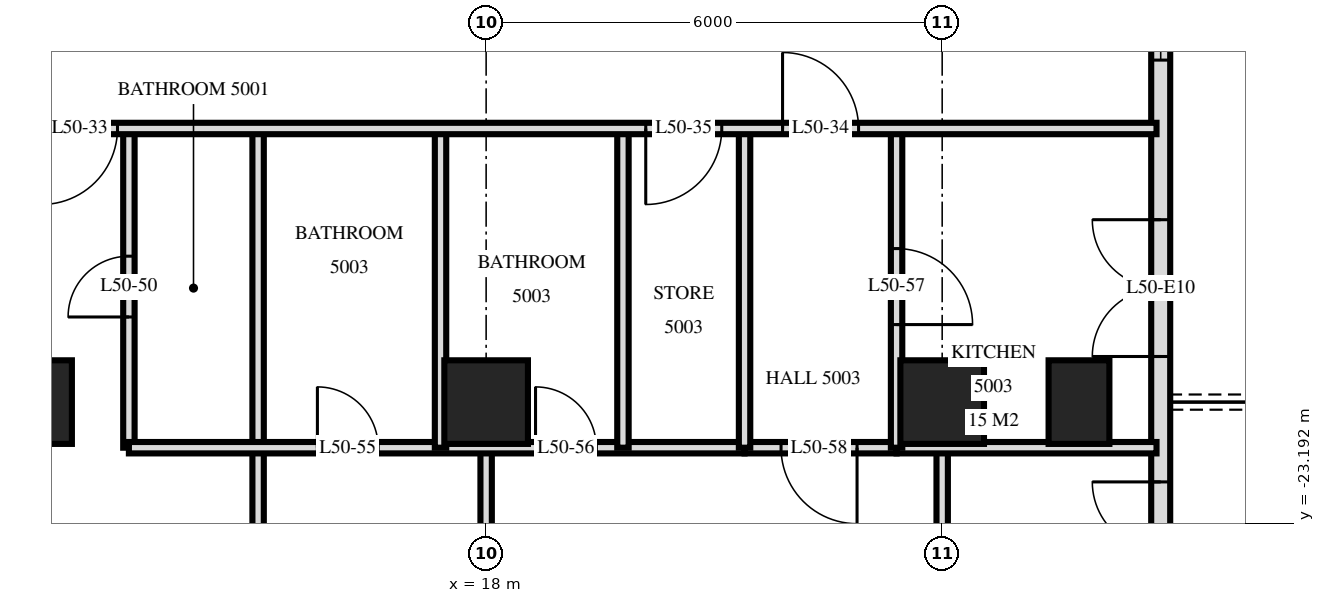
"""IFC4 building model, lengths in metres.
Left out: names, types, materials, properties, quantities, classifications, styles, units other than length and angle.
Written with IfcOpenShell. Run it as: python <this file> out.ifc"""

import sys

from ifc_helpers import new_model, si_unit, direction, frame, frame_2d, origin, origin_2d, place, context, subcontext, project, spatial, rectangle, extrude, element, fill, save


model = new_model("IFC4")
c1 = context("Model", 3, precision=1e-05, world=origin(), true_north=direction((0.0, 1.0)))
c2 = subcontext(c1, "Body", "Model", "MODEL_VIEW")
j1 = project(units=[si_unit("LENGTHUNIT", "METRE"), si_unit("PLANEANGLEUNIT", "RADIAN")], contexts=[c1])
p1 = place(None, origin())
s1 = spatial("IfcSite", under=j1, at=p1, CompositionType="ELEMENT")
p2 = place(p1, origin())
s2 = spatial("IfcBuilding", under=s1, at=p2, CompositionType="ELEMENT")
p3 = place(p2, frame((0.0, 0.0, 194.1)))
s3 = spatial("IfcBuildingStorey", under=s2, at=p3, CompositionType="ELEMENT", Elevation=194.1)
for number, where, z_axis, x_axis in (
    (1, (12.0, -21.6, 0.0), (0.0, 0.0, 1.0), (1.0, 0.0, 0.0)),
    (2, (18.0, -21.6, 0.0), (0.0, 0.0, 1.0), (1.0, 0.0, 0.0)),
    (3, (24.0, -21.6, 0.0), (0.0, 0.0, 1.0), (1.0, 0.0, 0.0)),
):
    element("IfcColumn", number, at=place(p3, frame(where, z_axis=z_axis, x_axis=x_axis)), inside=s3, PredefinedType="COLUMN", context=c2, shape_type="SweptSolid", body=[
        extrude(rectangle(XDim=1.1, YDim=1.1, at=origin_2d()), origin(), (0.0, 0.0, 1.0), 3.5),
    ])
p4 = place(p3, frame((25.8, -21.6, 0.0), z_axis=(0.0, 0.0, 1.0), x_axis=(0.0, 1.0, 0.0)))
e4 = element("IfcColumn", 4, at=p4, inside=s3, PredefinedType="COLUMN", context=c2, shape_type="SweptSolid", body=[
    extrude(rectangle(XDim=1.1, YDim=0.8, at=origin_2d()), origin(), (0.0, 0.0, 1.0), 3.5),
])
p5 = place(p3, frame((26.875, -24.875, 0.0), z_axis=(0.0, 0.0, 1.0), x_axis=(0.0, 1.0, 0.0)))
e5 = element("IfcWall", 5, at=p5, inside=s3, PredefinedType="SOLIDWALL", context=c2, shape_type="SweptSolid", body=[
    extrude(rectangle(XDim=21.551, YDim=0.25, at=frame_2d((10.775, 0.0))), origin(), (0.0, 0.0, 1.0), 3.22),
])
p6 = place(p5, frame((0.425, 0.0, 0.0)))
e6 = element("IfcOpeningElement", 6, at=p6, cuts=e5, PredefinedType="OPENING", context=c2, shape_type="SweptSolid", body=[
    extrude(rectangle(XDim=1.8, YDim=2.4, at=frame_2d((0.9, 1.2))), frame((0.0, 0.135, 0.0), z_axis=(0.0, -1.0, 0.0), x_axis=(1.0, 0.0, 0.0)), (0.0, 0.0, 1.0), 0.27),
])
p7 = place(p5, frame((3.875, 0.0, 0.0)))
e7 = element("IfcOpeningElement", 7, at=p7, cuts=e5, PredefinedType="OPENING", context=c2, shape_type="SweptSolid", body=[
    extrude(rectangle(XDim=1.8, YDim=2.4, at=frame_2d((0.9, 1.2))), frame((0.0, 0.135, 0.0), z_axis=(0.0, -1.0, 0.0), x_axis=(1.0, 0.0, 0.0)), (0.0, 0.0, 1.0), 0.27),
])
p8 = place(p5, frame((7.775, 0.0, 0.9)))
e8 = element("IfcOpeningElement", 8, at=p8, cuts=e5, PredefinedType="OPENING", context=c2, shape_type="SweptSolid", body=[
    extrude(rectangle(XDim=1.2, YDim=1.5, at=frame_2d((0.6, 0.75))), frame((0.0, 0.135, 0.0), z_axis=(0.0, -1.0, 0.0), x_axis=(1.0, 0.0, 0.0)), (0.0, 0.0, 1.0), 0.27),
])
p9 = place(p5, frame((11.975, 0.0, 0.0)))
e9 = element("IfcOpeningElement", 9, at=p9, cuts=e5, PredefinedType="OPENING", context=c2, shape_type="SweptSolid", body=[
    extrude(rectangle(XDim=1.8, YDim=2.4, at=frame_2d((0.9, 1.2))), frame((0.0, 0.135, 0.0), z_axis=(0.0, -1.0, 0.0), x_axis=(1.0, 0.0, 0.0)), (0.0, 0.0, 1.0), 0.27),
])
p10 = place(p3, frame((24.0, -28.918, 0.0), z_axis=(0.0, 0.0, 1.0), x_axis=(0.0, 1.0, 0.0)))
e10 = element("IfcWall", 10, at=p10, inside=s3, PredefinedType="PARTITIONING", context=c2, shape_type="SweptSolid", body=[
    extrude(rectangle(XDim=6.718, YDim=0.15, at=frame_2d((3.359, 0.0))), origin(), (0.0, 0.0, 1.0), 3.22),
])
p11 = place(p10, frame((2.948, 0.0, 0.0)))
e11 = element("IfcOpeningElement", 11, at=p11, cuts=e10, PredefinedType="OPENING", context=c2, shape_type="SweptSolid", body=[
    extrude(rectangle(XDim=0.9, YDim=2.1, at=frame_2d((0.45, 1.05))), frame((0.0, 0.085, 0.0), z_axis=(0.0, -1.0, 0.0), x_axis=(1.0, 0.0, 0.0)), (0.0, 0.0, 1.0), 0.17),
])
p12 = place(p3, frame((23.4, -22.2, 0.0), z_axis=(0.0, 0.0, 1.0), x_axis=(0.0, 1.0, 0.0)))
e12 = element("IfcWall", 12, at=p12, inside=s3, PredefinedType="PARTITIONING", context=c2, shape_type="SweptSolid", body=[
    extrude(rectangle(XDim=4.2, YDim=0.15, at=frame_2d((2.1, 0.0))), origin(), (0.0, 0.0, 1.0), 3.22),
])
p13 = place(p12, frame((1.62, 0.0, 0.0)))
e13 = element("IfcOpeningElement", 13, at=p13, cuts=e12, PredefinedType="OPENING", context=c2, shape_type="SweptSolid", body=[
    extrude(rectangle(XDim=1.0, YDim=2.1, at=frame_2d((0.5, 1.05))), frame((0.0, 0.085, 0.0), z_axis=(0.0, -1.0, 0.0), x_axis=(1.0, 0.0, 0.0)), (0.0, 0.0, 1.0), 0.17),
])
for number, where, z_axis, x_axis in (
    (14, (21.4, -22.2, 0.0), (0.0, 0.0, 1.0), (0.0, 1.0, 0.0)),
    (15, (19.8, -22.2, 0.0), (0.0, 0.0, 1.0), (0.0, 1.0, 0.0)),
):
    element("IfcWall", number, at=place(p3, frame(where, z_axis=z_axis, x_axis=x_axis)), inside=s3, PredefinedType="PARTITIONING", context=c2, shape_type="SweptSolid", body=[
        extrude(rectangle(XDim=4.2, YDim=0.15, at=frame_2d((2.1, 0.0))), origin(), (0.0, 0.0, 1.0), 3.22),
    ])
p14 = place(p3, frame((18.0, -29.22, 0.0), z_axis=(0.0, 0.0, 1.0), x_axis=(0.0, 1.0, 0.0)))
e16 = element("IfcWall", 16, at=p14, inside=s3, PredefinedType="PARTITIONING", context=c2, shape_type="SweptSolid", body=[
    extrude(rectangle(XDim=7.02, YDim=0.15, at=frame_2d((3.51, 0.0))), origin(), (0.0, 0.0, 1.0), 3.22),
])
p15 = place(p14, frame((2.99, 0.0, 0.0)))
e17 = element("IfcOpeningElement", 17, at=p15, cuts=e16, PredefinedType="OPENING", context=c2, shape_type="SweptSolid", body=[
    extrude(rectangle(XDim=0.9, YDim=2.1, at=frame_2d((0.45, 1.05))), frame((0.0, 0.085, 0.0), z_axis=(0.0, -1.0, 0.0), x_axis=(1.0, 0.0, 0.0)), (0.0, 0.0, 1.0), 0.17),
])
p16 = place(p3, frame((17.4, -22.2, 0.0), z_axis=(0.0, 0.0, 1.0), x_axis=(0.0, 1.0, 0.0)))
e18 = element("IfcWall", 18, at=p16, inside=s3, PredefinedType="PARTITIONING", context=c2, shape_type="SweptSolid", body=[
    extrude(rectangle(XDim=4.2, YDim=0.15, at=frame_2d((2.1, 0.0))), origin(), (0.0, 0.0, 1.0), 3.22),
])
p17 = place(p3, frame((15.0, -29.22, 0.0), z_axis=(0.0, 0.0, 1.0), x_axis=(0.0, 1.0, 0.0)))
e19 = element("IfcWall", 19, at=p17, inside=s3, PredefinedType="PARTITIONING", context=c2, shape_type="SweptSolid", body=[
    extrude(rectangle(XDim=11.22, YDim=0.15, at=frame_2d((5.61, 0.0))), origin(), (0.0, 0.0, 1.0), 3.22),
])
p18 = place(p3, frame((13.3, -22.2, 0.0), z_axis=(0.0, 0.0, 1.0), x_axis=(0.0, 1.0, 0.0)))
e20 = element("IfcWall", 20, at=p18, inside=s3, PredefinedType="PARTITIONING", context=c2, shape_type="SweptSolid", body=[
    extrude(rectangle(XDim=4.2, YDim=0.15, at=frame_2d((2.1, 0.0))), origin(), (0.0, 0.0, 1.0), 3.22),
])
p19 = place(p18, frame((1.72, 0.0, 0.0)))
e21 = element("IfcOpeningElement", 21, at=p19, cuts=e20, PredefinedType="OPENING", context=c2, shape_type="SweptSolid", body=[
    extrude(rectangle(XDim=0.8, YDim=2.1, at=frame_2d((0.4, 1.05))), frame((0.0, 0.085, 0.0), z_axis=(0.0, -1.0, 0.0), x_axis=(1.0, 0.0, 0.0)), (0.0, 0.0, 1.0), 0.17),
])
p20 = place(p3, frame((21.4, -22.2, 0.0), z_axis=(0.0, 0.0, 1.0), x_axis=(1.0, 0.0, 0.0)))
e22 = element("IfcWall", 22, at=p20, inside=s3, PredefinedType="PARTITIONING", context=c2, shape_type="SweptSolid", body=[
    extrude(rectangle(XDim=2.0, YDim=0.15, at=frame_2d((1.0, 0.0))), origin(), (0.0, 0.0, 1.0), 3.22),
])
p21 = place(p20, frame((0.48, 0.0, 0.0)))
e23 = element("IfcOpeningElement", 23, at=p21, cuts=e22, PredefinedType="OPENING", context=c2, shape_type="SweptSolid", body=[
    extrude(rectangle(XDim=1.0, YDim=2.1, at=frame_2d((0.5, 1.05))), frame((0.0, 0.085, 0.0), z_axis=(0.0, -1.0, 0.0), x_axis=(1.0, 0.0, 0.0)), (0.0, 0.0, 1.0), 0.17),
])
p22 = place(p3, frame((13.3, -22.2, 0.0), z_axis=(0.0, 0.0, 1.0), x_axis=(1.0, 0.0, 0.0)))
e24 = element("IfcWall", 24, at=p22, inside=s3, PredefinedType="PARTITIONING", context=c2, shape_type="SweptSolid", body=[
    extrude(rectangle(XDim=8.1, YDim=0.15, at=frame_2d((4.05, 0.0))), origin(), (0.0, 0.0, 1.0), 3.22),
])
p23 = place(p22, frame((2.48, 0.0, 0.0)))
e25 = element("IfcOpeningElement", 25, at=p23, cuts=e24, PredefinedType="OPENING", context=c2, shape_type="SweptSolid", body=[
    extrude(rectangle(XDim=0.8, YDim=2.1, at=frame_2d((0.4, 1.05))), frame((0.0, 0.085, 0.0), z_axis=(0.0, -1.0, 0.0), x_axis=(1.0, 0.0, 0.0)), (0.0, 0.0, 1.0), 0.17),
])
p24 = place(p22, frame((5.35, 0.0, 0.0)))
e26 = element("IfcOpeningElement", 26, at=p24, cuts=e24, PredefinedType="OPENING", context=c2, shape_type="SweptSolid", body=[
    extrude(rectangle(XDim=0.8, YDim=2.1, at=frame_2d((0.4, 1.05))), frame((0.0, 0.085, 0.0), z_axis=(0.0, -1.0, 0.0), x_axis=(1.0, 0.0, 0.0)), (0.0, 0.0, 1.0), 0.17),
])
p25 = place(p3, frame((23.4, -22.2, 0.0), z_axis=(0.0, 0.0, 1.0), x_axis=(1.0, 0.0, 0.0)))
e27 = element("IfcWall", 27, at=p25, inside=s3, PredefinedType="PARTITIONING", context=c2, shape_type="SweptSolid", body=[
    extrude(rectangle(XDim=3.42, YDim=0.15, at=frame_2d((1.71, 0.0))), origin(), (0.0, 0.0, 1.0), 3.22),
])
p26 = place(p3, frame((-26.82, -18.0, 0.0), z_axis=(0.0, 0.0, 1.0), x_axis=(1.0, 0.0, 0.0)))
e28 = element("IfcWall", 28, at=p26, inside=s3, PredefinedType="PARTITIONING", context=c2, shape_type="SweptSolid", body=[
    extrude(rectangle(XDim=53.64, YDim=0.15, at=frame_2d((26.82, 0.0))), origin(), (0.0, 0.0, 1.0), 3.22),
])
p27 = place(p26, frame((11.32, 0.0, 0.0)))
e29 = element("IfcOpeningElement", 29, at=p27, cuts=e28, PredefinedType="OPENING", context=c2, shape_type="SweptSolid", body=[
    extrude(rectangle(XDim=1.0, YDim=2.1, at=frame_2d((0.5, 1.05))), frame((0.0, 0.085, 0.0), z_axis=(0.0, -1.0, 0.0), x_axis=(1.0, 0.0, 0.0)), (0.0, 0.0, 1.0), 0.17),
])
p28 = place(p26, frame((3.22, 0.0, 0.0)))
e30 = element("IfcOpeningElement", 30, at=p28, cuts=e28, PredefinedType="OPENING", context=c2, shape_type="SweptSolid", body=[
    extrude(rectangle(XDim=1.0, YDim=2.1, at=frame_2d((0.5, 1.05))), frame((0.0, 0.085, 0.0), z_axis=(0.0, -1.0, 0.0), x_axis=(1.0, 0.0, 0.0)), (0.0, 0.0, 1.0), 0.17),
])
p29 = place(p26, frame((5.02, 0.0, 0.0)))
e31 = element("IfcOpeningElement", 31, at=p29, cuts=e28, PredefinedType="OPENING", context=c2, shape_type="SweptSolid", body=[
    extrude(rectangle(XDim=1.0, YDim=2.1, at=frame_2d((0.5, 1.05))), frame((0.0, 0.085, 0.0), z_axis=(0.0, -1.0, 0.0), x_axis=(1.0, 0.0, 0.0)), (0.0, 0.0, 1.0), 0.17),
])
p30 = place(p26, frame((38.97, 0.0, 0.0)))
e32 = element("IfcOpeningElement", 32, at=p30, cuts=e28, PredefinedType="OPENING", context=c2, shape_type="SweptSolid", body=[
    extrude(rectangle(XDim=1.0, YDim=2.1, at=frame_2d((0.5, 1.05))), frame((0.0, 0.085, 0.0), z_axis=(0.0, -1.0, 0.0), x_axis=(1.0, 0.0, 0.0)), (0.0, 0.0, 1.0), 0.17),
])
p31 = place(p26, frame((48.72, 0.0, 0.0)))
e33 = element("IfcOpeningElement", 33, at=p31, cuts=e28, PredefinedType="OPENING", context=c2, shape_type="SweptSolid", body=[
    extrude(rectangle(XDim=1.0, YDim=2.1, at=frame_2d((0.5, 1.05))), frame((0.0, 0.085, 0.0), z_axis=(0.0, -1.0, 0.0), x_axis=(1.0, 0.0, 0.0)), (0.0, 0.0, 1.0), 0.17),
])
p32 = place(p26, frame((46.92, 0.0, 0.0)))
e34 = element("IfcOpeningElement", 34, at=p32, cuts=e28, PredefinedType="OPENING", context=c2, shape_type="SweptSolid", body=[
    extrude(rectangle(XDim=1.0, YDim=2.1, at=frame_2d((0.5, 1.05))), frame((0.0, 0.085, 0.0), z_axis=(0.0, -1.0, 0.0), x_axis=(1.0, 0.0, 0.0)), (0.0, 0.0, 1.0), 0.17),
])
p33 = place(p26, frame((17.32, 0.0, 0.0)))
e35 = element("IfcOpeningElement", 35, at=p33, cuts=e28, PredefinedType="OPENING", context=c2, shape_type="SweptSolid", body=[
    extrude(rectangle(XDim=1.0, YDim=2.1, at=frame_2d((0.5, 1.05))), frame((0.0, 0.085, 0.0), z_axis=(0.0, -1.0, 0.0), x_axis=(1.0, 0.0, 0.0)), (0.0, 0.0, 1.0), 0.17),
])
p34 = place(p26, frame((23.32, 0.0, 0.0)))
e36 = element("IfcOpeningElement", 36, at=p34, cuts=e28, PredefinedType="OPENING", context=c2, shape_type="SweptSolid", body=[
    extrude(rectangle(XDim=1.0, YDim=2.1, at=frame_2d((0.5, 1.05))), frame((0.0, 0.085, 0.0), z_axis=(0.0, -1.0, 0.0), x_axis=(1.0, 0.0, 0.0)), (0.0, 0.0, 1.0), 0.17),
])
p35 = place(p26, frame((29.32, 0.0, 0.0)))
e37 = element("IfcOpeningElement", 37, at=p35, cuts=e28, PredefinedType="OPENING", context=c2, shape_type="SweptSolid", body=[
    extrude(rectangle(XDim=1.0, YDim=2.1, at=frame_2d((0.5, 1.05))), frame((0.0, 0.085, 0.0), z_axis=(0.0, -1.0, 0.0), x_axis=(1.0, 0.0, 0.0)), (0.0, 0.0, 1.0), 0.17),
])
p36 = place(p26, frame((35.32, 0.0, 0.0)))
e38 = element("IfcOpeningElement", 38, at=p36, cuts=e28, PredefinedType="OPENING", context=c2, shape_type="SweptSolid", body=[
    extrude(rectangle(XDim=1.0, YDim=2.1, at=frame_2d((0.5, 1.05))), frame((0.0, 0.085, 0.0), z_axis=(0.0, -1.0, 0.0), x_axis=(1.0, 0.0, 0.0)), (0.0, 0.0, 1.0), 0.17),
])
p37 = place(p6, origin())
e39 = element("IfcDoor", 39, at=p37, inside=s3, OperationType="DOUBLE_DOOR_SINGLE_SWING", PredefinedType="DOOR", context=c2, shape_type="SweptSolid", body=[
    extrude(rectangle(XDim=1.8, YDim=2.4, at=frame_2d((0.9, 1.2))), frame((0.0, 0.025, 0.0), z_axis=(0.0, -1.0, 0.0), x_axis=(1.0, 0.0, 0.0)), (0.0, 0.0, 1.0), 0.05),
])
fill(e6, e39)
p38 = place(p7, origin())
e40 = element("IfcDoor", 40, at=p38, inside=s3, OperationType="DOUBLE_DOOR_SINGLE_SWING", PredefinedType="DOOR", context=c2, shape_type="SweptSolid", body=[
    extrude(rectangle(XDim=1.8, YDim=2.4, at=frame_2d((0.9, 1.2))), frame((0.0, 0.025, 0.0), z_axis=(0.0, -1.0, 0.0), x_axis=(1.0, 0.0, 0.0)), (0.0, 0.0, 1.0), 0.05),
])
fill(e7, e40)
p39 = place(p8, origin())
e41 = element("IfcWindow", 41, at=p39, inside=s3, PartitioningType="SINGLE_PANEL", PredefinedType="WINDOW", context=c2, shape_type="SweptSolid", body=[
    extrude(rectangle(XDim=1.2, YDim=1.5, at=frame_2d((0.6, 0.75))), frame((0.0, 0.03, 0.0), z_axis=(0.0, -1.0, 0.0), x_axis=(1.0, 0.0, 0.0)), (0.0, 0.0, 1.0), 0.06),
])
fill(e8, e41)
p40 = place(p30, frame((0.5, 0.0, 0.0), z_axis=(0.0, 0.0, 1.0), x_axis=(-1.0, 0.0, 0.0)))
e42 = element("IfcDoor", 42, at=p40, inside=s3, OperationType="SINGLE_SWING_LEFT", PredefinedType="DOOR", context=c2, shape_type="SweptSolid", body=[
    extrude(rectangle(XDim=1.0, YDim=2.1, at=frame_2d((0.0, 1.05))), frame((0.0, -0.025, 0.0), z_axis=(0.0, 1.0, 0.0), x_axis=(-1.0, 0.0, 0.0)), (0.0, 0.0, 1.0), 0.05),
])
fill(e32, e42)
p41 = place(p31, origin())
e43 = element("IfcDoor", 43, at=p41, inside=s3, OperationType="SINGLE_SWING_RIGHT", PredefinedType="DOOR", context=c2, shape_type="SweptSolid", body=[
    extrude(rectangle(XDim=1.0, YDim=2.1, at=frame_2d((0.5, 1.05))), frame((0.0, 0.025, 0.0), z_axis=(0.0, -1.0, 0.0), x_axis=(1.0, 0.0, 0.0)), (0.0, 0.0, 1.0), 0.05),
])
fill(e33, e43)
p42 = place(p32, frame((0.5, 0.0, 0.0), z_axis=(0.0, 0.0, 1.0), x_axis=(-1.0, 0.0, 0.0)))
e44 = element("IfcDoor", 44, at=p42, inside=s3, OperationType="SINGLE_SWING_LEFT", PredefinedType="DOOR", context=c2, shape_type="SweptSolid", body=[
    extrude(rectangle(XDim=1.0, YDim=2.1, at=frame_2d((0.0, 1.05))), frame((0.0, -0.025, 0.0), z_axis=(0.0, 1.0, 0.0), x_axis=(-1.0, 0.0, 0.0)), (0.0, 0.0, 1.0), 0.05),
])
fill(e34, e44)
p43 = place(p19, origin())
e45 = element("IfcDoor", 45, at=p43, inside=s3, OperationType="SINGLE_SWING_RIGHT", PredefinedType="DOOR", context=c2, shape_type="SweptSolid", body=[
    extrude(rectangle(XDim=0.8, YDim=2.1, at=frame_2d((0.4, 1.05))), frame((0.0, 0.025, 0.0), z_axis=(0.0, -1.0, 0.0), x_axis=(1.0, 0.0, 0.0)), (0.0, 0.0, 1.0), 0.05),
])
fill(e21, e45)
p44 = place(p23, origin())
e46 = element("IfcDoor", 46, at=p44, inside=s3, OperationType="SINGLE_SWING_RIGHT", PredefinedType="DOOR", context=c2, shape_type="SweptSolid", body=[
    extrude(rectangle(XDim=0.8, YDim=2.1, at=frame_2d((0.4, 1.05))), frame((0.0, 0.025, 0.0), z_axis=(0.0, -1.0, 0.0), x_axis=(1.0, 0.0, 0.0)), (0.0, 0.0, 1.0), 0.05),
])
fill(e25, e46)
p45 = place(p24, origin())
e47 = element("IfcDoor", 47, at=p45, inside=s3, OperationType="SINGLE_SWING_RIGHT", PredefinedType="DOOR", context=c2, shape_type="SweptSolid", body=[
    extrude(rectangle(XDim=0.8, YDim=2.1, at=frame_2d((0.4, 1.05))), frame((0.0, 0.025, 0.0), z_axis=(0.0, -1.0, 0.0), x_axis=(1.0, 0.0, 0.0)), (0.0, 0.0, 1.0), 0.05),
])
fill(e26, e47)
p46 = place(p13, frame((0.5, 0.0, 0.0), z_axis=(0.0, 0.0, 1.0), x_axis=(-1.0, 0.0, 0.0)))
e48 = element("IfcDoor", 48, at=p46, inside=s3, OperationType="SINGLE_SWING_LEFT", PredefinedType="DOOR", context=c2, shape_type="SweptSolid", body=[
    extrude(rectangle(XDim=1.0, YDim=2.1, at=frame_2d((0.0, 1.05))), frame((0.0, -0.025, 0.0), z_axis=(0.0, 1.0, 0.0), x_axis=(-1.0, 0.0, 0.0)), (0.0, 0.0, 1.0), 0.05),
])
fill(e13, e48)
p47 = place(p21, frame((0.5, 0.0, 0.0), z_axis=(0.0, 0.0, 1.0), x_axis=(-1.0, 0.0, 0.0)))
e49 = element("IfcDoor", 49, at=p47, inside=s3, OperationType="SINGLE_SWING_RIGHT", PredefinedType="DOOR", context=c2, shape_type="SweptSolid", body=[
    extrude(rectangle(XDim=1.0, YDim=2.1, at=frame_2d((0.0, 1.05))), frame((0.0, -0.025, 0.0), z_axis=(0.0, 1.0, 0.0), x_axis=(-1.0, 0.0, 0.0)), (0.0, 0.0, 1.0), 0.05),
])
fill(e23, e49)
save(model, sys.argv[1])
